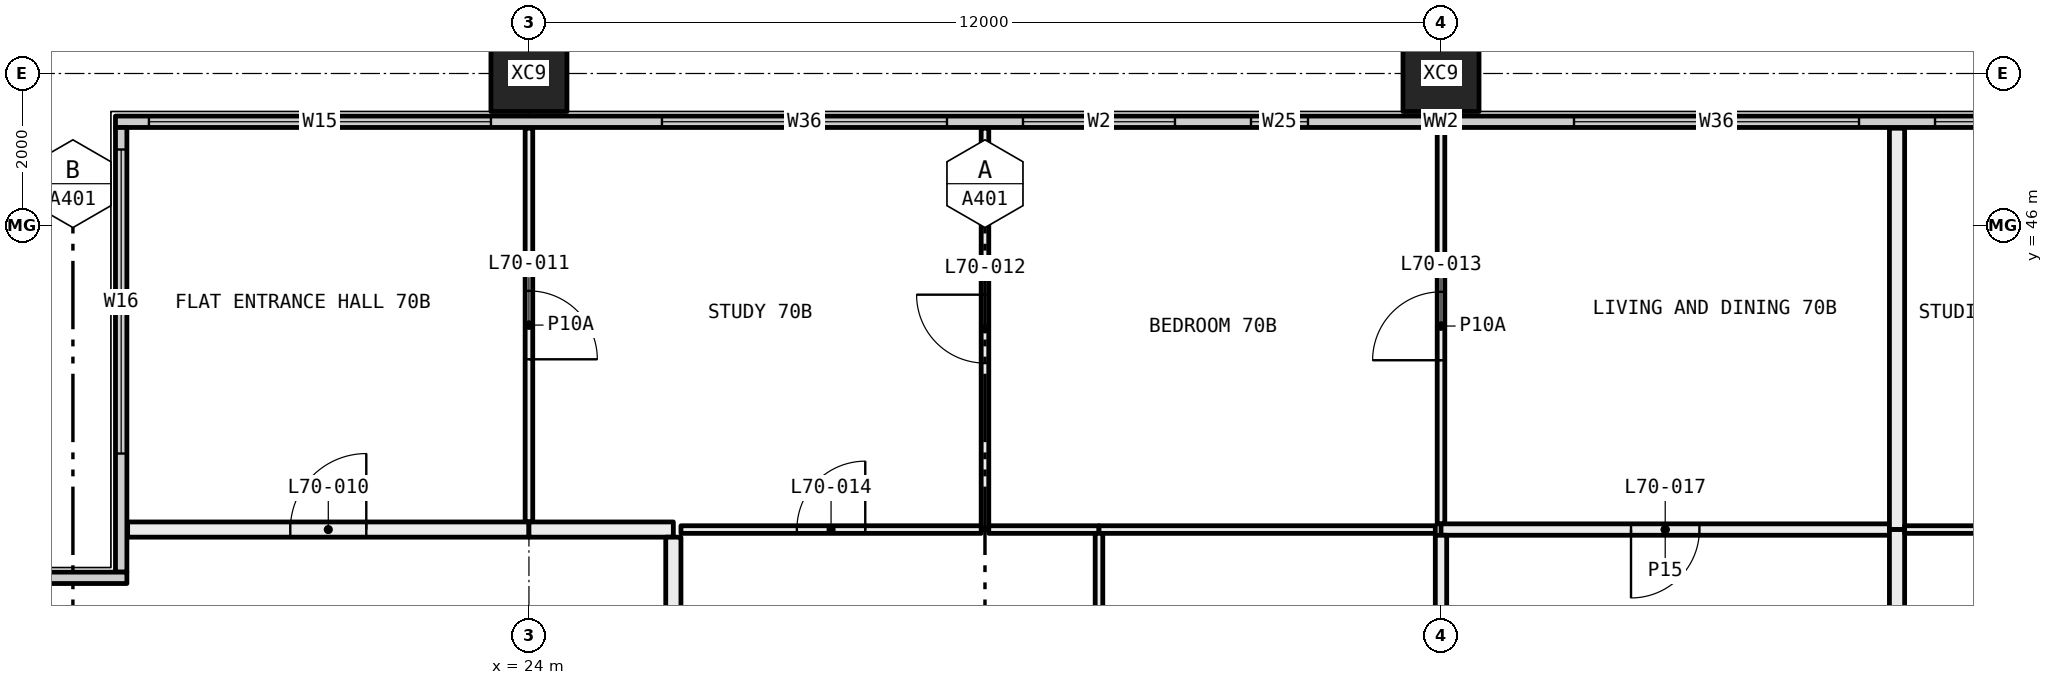
"""IFC4 building model, lengths in metres.
Left out: names, types, materials, properties, quantities, classifications, styles, units other than length and angle.
Written with IfcOpenShell. Run it as: python <this file> out.ifc"""

import sys

from ifc_helpers import new_model, si_unit, direction, frame, frame_2d, origin, origin_2d, place, context, subcontext, project, spatial, rectangle, hollow_rectangle, extrude, element, fill, save


model = new_model("IFC4")
c1 = context("Model", 3, precision=1e-05, world=origin(), true_north=direction((0.0, 1.0)))
c2 = subcontext(c1, "Body", "Model", "MODEL_VIEW")
j1 = project(units=[si_unit("LENGTHUNIT", "METRE"), si_unit("PLANEANGLEUNIT", "RADIAN")], contexts=[c1])
p1 = place(None, origin())
s1 = spatial("IfcSite", under=j1, at=p1, CompositionType="ELEMENT")
p2 = place(p1, origin())
s2 = spatial("IfcBuilding", under=s1, at=p2, CompositionType="ELEMENT")
p3 = place(p2, frame((0.0, 0.0, 259.35)))
s3 = spatial("IfcBuildingStorey", under=s2, at=p3, CompositionType="ELEMENT", Elevation=259.35)
for number, where, z_axis, x_axis in (
    (1, (24.0, 48.0, -0.4), (0.0, 0.0, 1.0), (1.0, 0.0, 0.0)),
    (2, (36.0, 48.0, -0.4), (0.0, 0.0, 1.0), (1.0, 0.0, 0.0)),
):
    element("IfcColumn", number, at=place(p3, frame(where, z_axis=z_axis, x_axis=x_axis)), inside=s3, PredefinedType="COLUMN", context=c2, shape_type="SweptSolid", body=[
        extrude(hollow_rectangle(XDim=1.0, YDim=1.0, WallThickness=0.036, at=origin_2d()), origin(), (0.0, 0.0, 1.0), 3.45),
    ])
p4 = place(p3, frame((18.56, 47.365, 0.0), z_axis=(0.0, 0.0, 1.0), x_axis=(1.0, 0.0, 0.0)))
e3 = element("IfcWall", 3, at=p4, inside=s3, PredefinedType="ELEMENTEDWALL", context=c2, shape_type="SweptSolid", body=[
    extrude(rectangle(XDim=34.88, YDim=0.15, at=frame_2d((17.44, 0.0))), origin(), (0.0, 0.0, 1.0), 3.05),
])
p5 = place(p4, frame((0.44, 0.0, 0.45)))
e4 = element("IfcOpeningElement", 4, at=p5, cuts=e3, PredefinedType="OPENING", context=c2, shape_type="SweptSolid", body=[
    extrude(rectangle(XDim=4.5, YDim=2.55, at=frame_2d((2.25, 1.275))), frame((0.0, 0.085, 0.0), z_axis=(0.0, -1.0, 0.0), x_axis=(1.0, 0.0, 0.0)), (0.0, 0.0, 1.0), 0.17),
])
p6 = place(p4, frame((7.19, 0.0, 0.45)))
e5 = element("IfcOpeningElement", 5, at=p6, cuts=e3, PredefinedType="OPENING", context=c2, shape_type="SweptSolid", body=[
    extrude(rectangle(XDim=3.75, YDim=2.55, at=frame_2d((1.875, 1.275))), frame((0.0, 0.085, 0.0), z_axis=(0.0, -1.0, 0.0), x_axis=(1.0, 0.0, 0.0)), (0.0, 0.0, 1.0), 0.17),
])
p7 = place(p4, frame((11.94, 0.0, 0.45)))
e6 = element("IfcOpeningElement", 6, at=p7, cuts=e3, PredefinedType="OPENING", context=c2, shape_type="SweptSolid", body=[
    extrude(rectangle(XDim=2.0, YDim=2.55, at=frame_2d((1.0, 1.275))), frame((0.0, 0.085, 0.0), z_axis=(0.0, -1.0, 0.0), x_axis=(1.0, 0.0, 0.0)), (0.0, 0.0, 1.0), 0.17),
])
p8 = place(p4, frame((14.94, 0.0, 0.45)))
e7 = element("IfcOpeningElement", 7, at=p8, cuts=e3, PredefinedType="OPENING", context=c2, shape_type="SweptSolid", body=[
    extrude(rectangle(XDim=0.75, YDim=2.55, at=frame_2d((0.375, 1.275))), frame((0.0, 0.085, 0.0), z_axis=(0.0, -1.0, 0.0), x_axis=(1.0, 0.0, 0.0)), (0.0, 0.0, 1.0), 0.17),
])
p9 = place(p4, frame((19.19, 0.0, 0.45)))
e8 = element("IfcOpeningElement", 8, at=p9, cuts=e3, PredefinedType="OPENING", context=c2, shape_type="SweptSolid", body=[
    extrude(rectangle(XDim=3.75, YDim=2.55, at=frame_2d((1.875, 1.275))), frame((0.0, 0.085, 0.0), z_axis=(0.0, -1.0, 0.0), x_axis=(1.0, 0.0, 0.0)), (0.0, 0.0, 1.0), 0.17),
])
p10 = place(p4, frame((23.94, 0.0, 0.45)))
e9 = element("IfcOpeningElement", 9, at=p10, cuts=e3, PredefinedType="OPENING", context=c2, shape_type="SweptSolid", body=[
    extrude(rectangle(XDim=3.75, YDim=2.55, at=frame_2d((1.875, 1.275))), frame((0.0, 0.085, 0.0), z_axis=(0.0, -1.0, 0.0), x_axis=(1.0, 0.0, 0.0)), (0.0, 0.0, 1.0), 0.17),
])
p11 = place(p4, frame((29.94, 0.0, 0.45)))
e10 = element("IfcOpeningElement", 10, at=p11, cuts=e3, PredefinedType="OPENING", context=c2, shape_type="SweptSolid", body=[
    extrude(rectangle(XDim=4.5, YDim=2.55, at=frame_2d((2.25, 1.275))), frame((0.0, 0.085, 0.0), z_axis=(0.0, -1.0, 0.0), x_axis=(1.0, 0.0, 0.0)), (0.0, 0.0, 1.0), 0.17),
])
p12 = place(p3, frame((18.635, 41.44, 0.0), z_axis=(0.0, 0.0, 1.0), x_axis=(0.0, 1.0, 0.0)))
e11 = element("IfcWall", 11, at=p12, inside=s3, PredefinedType="ELEMENTEDWALL", context=c2, shape_type="SweptSolid", body=[
    extrude(rectangle(XDim=5.85, YDim=0.15, at=frame_2d((2.925, 0.0))), origin(), (0.0, 0.0, 1.0), 3.05),
])
p13 = place(p12, frame((1.56, 0.0, 0.45)))
e12 = element("IfcOpeningElement", 12, at=p13, cuts=e11, PredefinedType="OPENING", context=c2, shape_type="SweptSolid", body=[
    extrude(rectangle(XDim=4.0, YDim=2.55, at=frame_2d((2.0, 1.275))), frame((0.0, 0.085, 0.0), z_axis=(0.0, -1.0, 0.0), x_axis=(1.0, 0.0, 0.0)), (0.0, 0.0, 1.0), 0.17),
])
p14 = place(p3, frame((12.56, 41.365, 0.0), z_axis=(0.0, 0.0, 1.0), x_axis=(1.0, 0.0, 0.0)))
e13 = element("IfcWall", 13, at=p14, inside=s3, PredefinedType="ELEMENTEDWALL", context=c2, shape_type="SweptSolid", body=[
    extrude(rectangle(XDim=6.15, YDim=0.15, at=frame_2d((3.075, 0.0))), origin(), (0.0, 0.0, 1.0), 3.05),
])
p15 = place(p14, frame((0.44, 0.0, 0.45)))
e14 = element("IfcOpeningElement", 14, at=p15, cuts=e13, PredefinedType="OPENING", context=c2, shape_type="SweptSolid", body=[
    extrude(rectangle(XDim=4.0, YDim=2.55, at=frame_2d((2.0, 1.275))), frame((0.0, 0.085, 0.0), z_axis=(0.0, -1.0, 0.0), x_axis=(1.0, 0.0, 0.0)), (0.0, 0.0, 1.0), 0.17),
])
p16 = place(p3, frame((24.0, 42.1, 0.0), z_axis=(0.0, 0.0, 1.0), x_axis=(0.0, 1.0, 0.0)))
e15 = element("IfcWall", 15, at=p16, inside=s3, PredefinedType="PARTITIONING", context=c2, shape_type="SweptSolid", body=[
    extrude(rectangle(XDim=5.18, YDim=0.1, at=frame_2d((2.59, 0.0))), origin(), (0.0, 0.0, 1.0), 3.05),
])
p17 = place(p16, frame((2.14, 0.0, 0.0)))
e16 = element("IfcOpeningElement", 16, at=p17, cuts=e15, PredefinedType="OPENING", context=c2, shape_type="SweptSolid", body=[
    extrude(rectangle(XDim=0.9, YDim=2.1, at=frame_2d((0.45, 1.05))), frame((0.0, 0.06, 0.0), z_axis=(0.0, -1.0, 0.0), x_axis=(1.0, 0.0, 0.0)), (0.0, 0.0, 1.0), 0.12),
])
p18 = place(p3, frame((18.72, 42.0, 0.0), z_axis=(0.0, 0.0, 1.0), x_axis=(1.0, 0.0, 0.0)))
e17 = element("IfcWall", 17, at=p18, inside=s3, PredefinedType="PARTITIONING", context=c2, shape_type="SweptSolid", body=[
    extrude(rectangle(XDim=5.28, YDim=0.2, at=frame_2d((2.64, 0.0))), origin(), (0.0, 0.0, 1.0), 3.05),
])
p19 = place(p18, frame((2.14, 0.0, 0.0)))
e18 = element("IfcOpeningElement", 18, at=p19, cuts=e17, PredefinedType="OPENING", context=c2, shape_type="SweptSolid", body=[
    extrude(rectangle(XDim=1.0, YDim=2.1, at=frame_2d((0.5, 1.05))), frame((0.0, 0.11, 0.0), z_axis=(0.0, -1.0, 0.0), x_axis=(1.0, 0.0, 0.0)), (0.0, 0.0, 1.0), 0.22),
])
p20 = place(p3, frame((30.0, 42.0, 0.0), z_axis=(0.0, 0.0, 1.0), x_axis=(0.0, 1.0, 0.0)))
e19 = element("IfcWall", 19, at=p20, inside=s3, PredefinedType="PARTITIONING", context=c2, shape_type="SweptSolid", body=[
    extrude(rectangle(XDim=5.28, YDim=0.1, at=frame_2d((2.64, 0.0))), origin(), (0.0, 0.0, 1.0), 3.05),
])
p21 = place(p20, frame((2.19, 0.0, 0.0)))
e20 = element("IfcOpeningElement", 20, at=p21, cuts=e19, PredefinedType="OPENING", context=c2, shape_type="SweptSolid", body=[
    extrude(rectangle(XDim=0.9, YDim=2.1, at=frame_2d((0.45, 1.05))), frame((0.0, 0.06, 0.0), z_axis=(0.0, -1.0, 0.0), x_axis=(1.0, 0.0, 0.0)), (0.0, 0.0, 1.0), 0.12),
])
p22 = place(p3, frame((26.0, 42.0, 0.0), z_axis=(0.0, 0.0, 1.0), x_axis=(1.0, 0.0, 0.0)))
e21 = element("IfcWall", 21, at=p22, inside=s3, PredefinedType="PARTITIONING", context=c2, shape_type="SweptSolid", body=[
    extrude(rectangle(XDim=3.95, YDim=0.1, at=frame_2d((1.975, 0.0))), origin(), (0.0, 0.0, 1.0), 3.05),
])
p23 = place(p22, frame((1.525, 0.0, 0.0)))
e22 = element("IfcOpeningElement", 22, at=p23, cuts=e21, PredefinedType="OPENING", context=c2, shape_type="SweptSolid", body=[
    extrude(rectangle(XDim=0.9, YDim=2.1, at=frame_2d((0.45, 1.05))), frame((0.0, 0.06, 0.0), z_axis=(0.0, -1.0, 0.0), x_axis=(1.0, 0.0, 0.0)), (0.0, 0.0, 1.0), 0.12),
])
p24 = place(p3, frame((24.0, 42.0, 0.0), z_axis=(0.0, 0.0, 1.0), x_axis=(1.0, 0.0, 0.0)))
e23 = element("IfcWall", 23, at=p24, inside=s3, PredefinedType="PARTITIONING", context=c2, shape_type="SweptSolid", body=[
    extrude(rectangle(XDim=1.9, YDim=0.2, at=frame_2d((0.95, 0.0))), origin(), (0.0, 0.0, 1.0), 3.05),
])
p25 = place(p3, frame((36.0, 42.075, 0.0), z_axis=(0.0, 0.0, 1.0), x_axis=(0.0, 1.0, 0.0)))
e24 = element("IfcWall", 24, at=p25, inside=s3, PredefinedType="PARTITIONING", context=c2, shape_type="SweptSolid", body=[
    extrude(rectangle(XDim=5.205, YDim=0.1, at=frame_2d((2.603, 0.0))), origin(), (0.0, 0.0, 1.0), 2.45),
])
p26 = place(p25, frame((2.153, 0.0, 0.0)))
e25 = element("IfcOpeningElement", 25, at=p26, cuts=e24, PredefinedType="OPENING", context=c2, shape_type="SweptSolid", body=[
    extrude(rectangle(XDim=0.9, YDim=2.1, at=frame_2d((0.45, 1.05))), frame((0.0, 0.06, 0.0), z_axis=(0.0, -1.0, 0.0), x_axis=(1.0, 0.0, 0.0)), (0.0, 0.0, 1.0), 0.12),
])
p27 = place(p3, frame((30.05, 42.0, 0.0), z_axis=(0.0, 0.0, 1.0), x_axis=(1.0, 0.0, 0.0)))
e26 = element("IfcWall", 26, at=p27, inside=s3, PredefinedType="PARTITIONING", context=c2, shape_type="SweptSolid", body=[
    extrude(rectangle(XDim=1.45, YDim=0.1, at=frame_2d((0.725, 0.0))), origin(), (0.0, 0.0, 1.0), 3.05),
])
p28 = place(p3, frame((31.5, 42.0, 0.0), z_axis=(0.0, 0.0, 1.0), x_axis=(1.0, 0.0, 0.0)))
e27 = element("IfcWall", 27, at=p28, inside=s3, PredefinedType="PARTITIONING", context=c2, shape_type="SweptSolid", body=[
    extrude(rectangle(XDim=4.425, YDim=0.1, at=frame_2d((2.212, 0.0))), origin(), (0.0, 0.0, 1.0), 2.45),
])
p29 = place(p3, frame((36.0, 42.0, 0.0), z_axis=(0.0, 0.0, 1.0), x_axis=(1.0, 0.0, 0.0)))
e28 = element("IfcWall", 28, at=p29, inside=s3, PredefinedType="PARTITIONING", context=c2, shape_type="SweptSolid", body=[
    extrude(rectangle(XDim=5.9, YDim=0.15, at=frame_2d((2.95, 0.0))), origin(), (0.0, 0.0, 1.0), 2.45),
])
p30 = place(p29, frame((2.5, 0.0, 0.0)))
e29 = element("IfcOpeningElement", 29, at=p30, cuts=e28, PredefinedType="OPENING", context=c2, shape_type="SweptSolid", body=[
    extrude(rectangle(XDim=0.9, YDim=2.1, at=frame_2d((0.45, 1.05))), frame((0.0, 0.085, 0.0), z_axis=(0.0, -1.0, 0.0), x_axis=(1.0, 0.0, 0.0)), (0.0, 0.0, 1.0), 0.17),
])
p31 = place(p3, frame((42.0, 42.0, 0.0), z_axis=(0.0, 0.0, 1.0), x_axis=(0.0, 1.0, 0.0)))
e30 = element("IfcWall", 30, at=p31, inside=s3, PredefinedType="PARTITIONING", context=c2, shape_type="SweptSolid", body=[
    extrude(rectangle(XDim=5.28, YDim=0.2, at=frame_2d((2.64, 0.0))), origin(), (0.0, 0.0, 1.0), 3.05),
])
p32 = place(p3, frame((31.5, 36.1, 0.0), z_axis=(0.0, 0.0, 1.0), x_axis=(0.0, 1.0, 0.0)))
e31 = element("IfcWall", 31, at=p32, inside=s3, PredefinedType="PARTITIONING", context=c2, shape_type="SweptSolid", body=[
    extrude(rectangle(XDim=5.85, YDim=0.1, at=frame_2d((2.925, 0.0))), origin(), (0.0, 0.0, 1.0), 3.05),
])
p33 = place(p32, frame((2.475, 0.0, 0.0)))
e32 = element("IfcOpeningElement", 32, at=p33, cuts=e31, PredefinedType="OPENING", context=c2, shape_type="SweptSolid", body=[
    extrude(rectangle(XDim=0.9, YDim=2.1, at=frame_2d((0.45, 1.05))), frame((0.0, 0.06, 0.0), z_axis=(0.0, -1.0, 0.0), x_axis=(1.0, 0.0, 0.0)), (0.0, 0.0, 1.0), 0.12),
])
p34 = place(p3, frame((25.9, 41.9, 0.0), z_axis=(0.0, 0.0, 1.0), x_axis=(0.0, -1.0, 0.0)))
e33 = element("IfcWall", 33, at=p34, inside=s3, PredefinedType="PARTITIONING", context=c2, shape_type="SweptSolid", body=[
    extrude(rectangle(XDim=6.2, YDim=0.2, at=frame_2d((3.1, 0.0))), origin(), (0.0, 0.0, 1.0), 2.45),
])
p35 = place(p3, frame((36.0, 38.1, 0.0), z_axis=(0.0, 0.0, 1.0), x_axis=(0.0, 1.0, 0.0)))
e34 = element("IfcWall", 34, at=p35, inside=s3, PredefinedType="PARTITIONING", context=c2, shape_type="SweptSolid", body=[
    extrude(rectangle(XDim=3.825, YDim=0.15, at=frame_2d((1.913, 0.0))), origin(), (0.0, 0.0, 1.0), 2.45),
])
p36 = place(p3, frame((42.0, 38.1, 0.0), z_axis=(0.0, 0.0, 1.0), x_axis=(0.0, 1.0, 0.0)))
e35 = element("IfcWall", 35, at=p36, inside=s3, PredefinedType="PARTITIONING", context=c2, shape_type="SweptSolid", body=[
    extrude(rectangle(XDim=3.9, YDim=0.2, at=frame_2d((1.95, 0.0))), origin(), (0.0, 0.0, 1.0), 3.05),
])
p37 = place(p3, frame((42.1, 42.0, 0.0), z_axis=(0.0, 0.0, 1.0), x_axis=(1.0, 0.0, 0.0)))
e36 = element("IfcWall", 36, at=p37, inside=s3, PredefinedType="PARTITIONING", context=c2, shape_type="SweptSolid", body=[
    extrude(rectangle(XDim=3.9, YDim=0.1, at=frame_2d((1.95, 0.0))), origin(), (0.0, 0.0, 1.0), 3.05),
])
p38 = place(p37, frame((1.5, 0.0, 0.0)))
e37 = element("IfcOpeningElement", 37, at=p38, cuts=e36, PredefinedType="OPENING", context=c2, shape_type="SweptSolid", body=[
    extrude(rectangle(XDim=0.9, YDim=2.1, at=frame_2d((0.45, 1.05))), frame((0.0, 0.06, 0.0), z_axis=(0.0, -1.0, 0.0), x_axis=(1.0, 0.0, 0.0)), (0.0, 0.0, 1.0), 0.12),
])
p39 = place(p5, origin())
e38 = element("IfcWindow", 38, at=p39, inside=s3, PartitioningType="SINGLE_PANEL", PredefinedType="WINDOW", context=c2, shape_type="SweptSolid", body=[
    extrude(rectangle(XDim=4.5, YDim=2.55, at=frame_2d((2.25, 1.275))), frame((0.0, 0.03, 0.0), z_axis=(0.0, -1.0, 0.0), x_axis=(1.0, 0.0, 0.0)), (0.0, 0.0, 1.0), 0.06),
])
fill(e4, e38)
p40 = place(p6, origin())
e39 = element("IfcWindow", 39, at=p40, inside=s3, PartitioningType="SINGLE_PANEL", PredefinedType="WINDOW", context=c2, shape_type="SweptSolid", body=[
    extrude(rectangle(XDim=3.75, YDim=2.55, at=frame_2d((1.875, 1.275))), frame((0.0, 0.03, 0.0), z_axis=(0.0, -1.0, 0.0), x_axis=(1.0, 0.0, 0.0)), (0.0, 0.0, 1.0), 0.06),
])
fill(e5, e39)
p41 = place(p7, origin())
e40 = element("IfcWindow", 40, at=p41, inside=s3, PartitioningType="SINGLE_PANEL", PredefinedType="WINDOW", context=c2, shape_type="SweptSolid", body=[
    extrude(rectangle(XDim=2.0, YDim=2.55, at=frame_2d((1.0, 1.275))), frame((0.0, 0.03, 0.0), z_axis=(0.0, -1.0, 0.0), x_axis=(1.0, 0.0, 0.0)), (0.0, 0.0, 1.0), 0.06),
])
fill(e6, e40)
p42 = place(p8, origin())
e41 = element("IfcWindow", 41, at=p42, inside=s3, PartitioningType="SINGLE_PANEL", PredefinedType="WINDOW", context=c2, shape_type="SweptSolid", body=[
    extrude(rectangle(XDim=0.75, YDim=2.55, at=frame_2d((0.375, 1.275))), frame((0.0, 0.03, 0.0), z_axis=(0.0, -1.0, 0.0), x_axis=(1.0, 0.0, 0.0)), (0.0, 0.0, 1.0), 0.06),
])
fill(e7, e41)
p43 = place(p9, origin())
e42 = element("IfcWindow", 42, at=p43, inside=s3, PartitioningType="SINGLE_PANEL", PredefinedType="WINDOW", context=c2, shape_type="SweptSolid", body=[
    extrude(rectangle(XDim=3.75, YDim=2.55, at=frame_2d((1.875, 1.275))), frame((0.0, 0.03, 0.0), z_axis=(0.0, -1.0, 0.0), x_axis=(1.0, 0.0, 0.0)), (0.0, 0.0, 1.0), 0.06),
])
fill(e8, e42)
p44 = place(p10, origin())
e43 = element("IfcWindow", 43, at=p44, inside=s3, PartitioningType="SINGLE_PANEL", PredefinedType="WINDOW", context=c2, shape_type="SweptSolid", body=[
    extrude(rectangle(XDim=3.75, YDim=2.55, at=frame_2d((1.875, 1.275))), frame((0.0, 0.03, 0.0), z_axis=(0.0, -1.0, 0.0), x_axis=(1.0, 0.0, 0.0)), (0.0, 0.0, 1.0), 0.06),
])
fill(e9, e43)
p45 = place(p13, origin())
e44 = element("IfcWindow", 44, at=p45, inside=s3, PartitioningType="SINGLE_PANEL", PredefinedType="WINDOW", context=c2, shape_type="SweptSolid", body=[
    extrude(rectangle(XDim=4.0, YDim=2.55, at=frame_2d((2.0, 1.275))), frame((0.0, 0.03, 0.0), z_axis=(0.0, -1.0, 0.0), x_axis=(1.0, 0.0, 0.0)), (0.0, 0.0, 1.0), 0.06),
])
fill(e12, e44)
p46 = place(p19, origin())
e45 = element("IfcDoor", 45, at=p46, inside=s3, OperationType="SINGLE_SWING_LEFT", PredefinedType="DOOR", context=c2, shape_type="SweptSolid", body=[
    extrude(rectangle(XDim=1.0, YDim=2.1, at=frame_2d((0.5, 1.05))), frame((0.0, 0.025, 0.0), z_axis=(0.0, -1.0, 0.0), x_axis=(1.0, 0.0, 0.0)), (0.0, 0.0, 1.0), 0.05),
])
fill(e18, e45)
p47 = place(p17, frame((0.9, 0.0, 0.0), x_axis=(-1.0, 0.0, 0.0)))
e46 = element("IfcDoor", 46, at=p47, inside=s3, OperationType="SINGLE_SWING_LEFT", PredefinedType="DOOR", context=c2, shape_type="SweptSolid", body=[
    extrude(rectangle(XDim=0.9, YDim=2.1, at=frame_2d((0.45, 1.05))), frame((0.0, 0.025, 0.0), z_axis=(0.0, -1.0, 0.0), x_axis=(1.0, 0.0, 0.0)), (0.0, 0.0, 1.0), 0.05),
])
fill(e16, e46)
p48 = place(p21, origin())
e47 = element("IfcDoor", 47, at=p48, inside=s3, OperationType="SINGLE_SWING_LEFT", PredefinedType="DOOR", context=c2, shape_type="SweptSolid", body=[
    extrude(rectangle(XDim=0.9, YDim=2.1, at=frame_2d((0.45, 1.05))), frame((0.0, 0.025, 0.0), z_axis=(0.0, -1.0, 0.0), x_axis=(1.0, 0.0, 0.0)), (0.0, 0.0, 1.0), 0.05),
])
fill(e20, e47)
p49 = place(p26, origin())
e48 = element("IfcDoor", 48, at=p49, inside=s3, OperationType="SINGLE_SWING_RIGHT", PredefinedType="DOOR", context=c2, shape_type="SweptSolid", body=[
    extrude(rectangle(XDim=0.9, YDim=2.1, at=frame_2d((0.45, 1.05))), frame((0.0, 0.025, 0.0), z_axis=(0.0, -1.0, 0.0), x_axis=(1.0, 0.0, 0.0)), (0.0, 0.0, 1.0), 0.05),
])
fill(e25, e48)
p50 = place(p23, origin())
e49 = element("IfcDoor", 49, at=p50, inside=s3, OperationType="SINGLE_SWING_LEFT", PredefinedType="DOOR", context=c2, shape_type="SweptSolid", body=[
    extrude(rectangle(XDim=0.9, YDim=2.1, at=frame_2d((0.45, 1.05))), frame((0.0, 0.025, 0.0), z_axis=(0.0, -1.0, 0.0), x_axis=(1.0, 0.0, 0.0)), (0.0, 0.0, 1.0), 0.05),
])
fill(e22, e49)
p51 = place(p30, frame((0.9, 0.0, 0.0), x_axis=(-1.0, 0.0, 0.0)))
e50 = element("IfcDoor", 50, at=p51, inside=s3, OperationType="SINGLE_SWING_LEFT", PredefinedType="DOOR", context=c2, shape_type="SweptSolid", body=[
    extrude(rectangle(XDim=0.9, YDim=2.1, at=frame_2d((0.45, 1.05))), frame((0.0, 0.025, 0.0), z_axis=(0.0, -1.0, 0.0), x_axis=(1.0, 0.0, 0.0)), (0.0, 0.0, 1.0), 0.05),
])
fill(e29, e50)
save(model, sys.argv[1])
